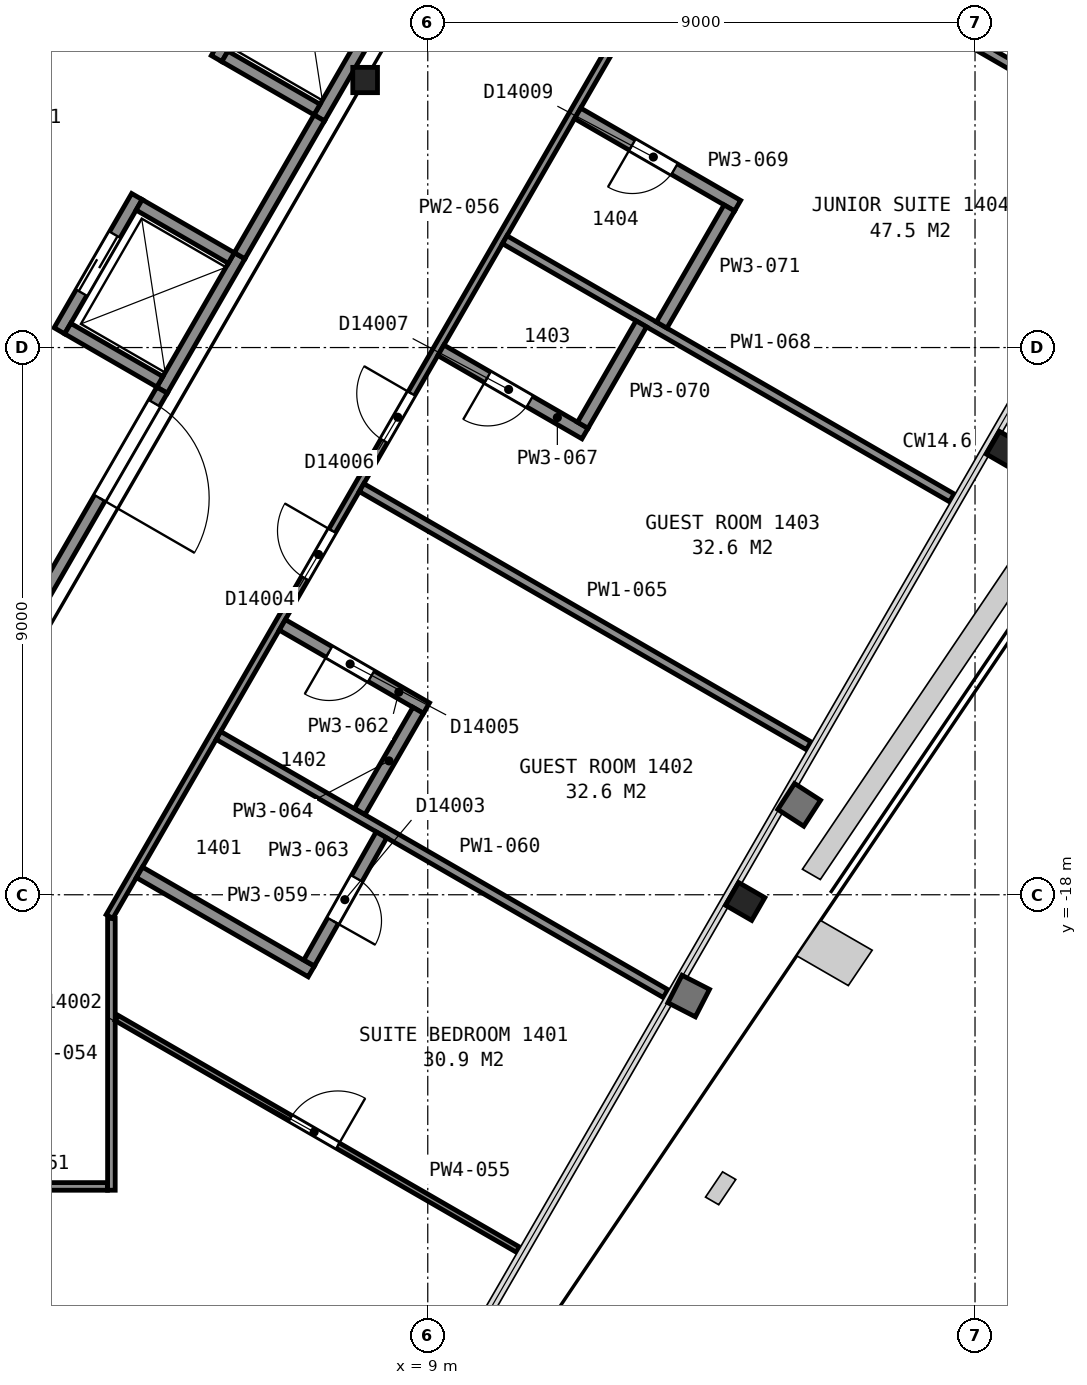
"""IFC4 building model, lengths in metres.
Left out: names, types, materials, properties, quantities, classifications, styles, units other than length and angle.
Written with IfcOpenShell. Run it as: python <this file> out.ifc"""

import sys

from ifc_helpers import new_model, si_unit, direction, frame, frame_2d, origin, origin_2d, place, context, subcontext, project, spatial, rectangle, i_section, extrude, element, fill, save


model = new_model("IFC4")
c1 = context("Model", 3, precision=1e-05, world=origin(), true_north=direction((0.0, 1.0)))
c2 = subcontext(c1, "Body", "Model", "MODEL_VIEW")
j1 = project(units=[si_unit("LENGTHUNIT", "METRE"), si_unit("PLANEANGLEUNIT", "RADIAN")], contexts=[c1])
p1 = place(None, origin())
s1 = spatial("IfcSite", under=j1, at=p1, CompositionType="ELEMENT")
p2 = place(p1, origin())
s2 = spatial("IfcBuilding", under=s1, at=p2, CompositionType="ELEMENT")
p3 = place(p2, frame((0.0, 0.0, 65.6)))
s3 = spatial("IfcBuildingStorey", under=s2, at=p3, CompositionType="ELEMENT", Elevation=65.6)
for number, where, z_axis, x_axis in (
    (1, (14.22, -18.11, 0.025), (0.0, 0.0, 1.0), (-0.5, -0.866, 0.0)),
    (2, (18.51, -10.69, 0.025), (0.0, 0.0, 1.0), (-0.5, -0.866, 0.0)),
):
    element("IfcColumn", number, at=place(p3, frame(where, z_axis=z_axis, x_axis=x_axis)), inside=s3, PredefinedType="COLUMN", context=c2, shape_type="SweptSolid", body=[
        extrude(i_section(OverallWidth=0.432, OverallDepth=0.498, WebThickness=0.056, FlangeThickness=0.089, FilletRadius=0.015, at=origin_2d()), origin(), (0.0, 0.0, 1.0), 3.575),
    ])
p4 = place(p3, frame((7.97, -4.6, 0.0), z_axis=(0.0, 0.0, 1.0), x_axis=(1.0, 0.0, 0.0)))
e3 = element("IfcColumn", 3, at=p4, inside=s3, PredefinedType="COLUMN", context=c2, shape_type="SweptSolid", body=[
    extrude(i_section(OverallWidth=0.406, OverallDepth=0.417, WebThickness=0.03, FlangeThickness=0.048, FilletRadius=0.015, at=origin_2d()), origin(), (0.0, 0.0, 1.0), 3.6),
])
p5 = place(p3, frame((4.63, -9.7, 0.0), z_axis=(0.0, 0.0, 1.0), x_axis=(0.500062241894, 0.865989465428, 0.0)))
e4 = element("IfcWall", 4, at=p5, inside=s3, PredefinedType="PARTITIONING", context=c2, shape_type="SweptSolid", body=[
    extrude(rectangle(XDim=2.55, YDim=0.2, at=frame_2d((1.275, 0.0))), origin(), (0.0, 0.0, 1.0), 3.6),
])
p6 = place(p3, frame((7.216, -5.222, 0.0), z_axis=(0.0, 0.0, 1.0), x_axis=(0.499990435942, 0.866030925526, 0.0)))
e5 = element("IfcWall", 5, at=p6, inside=s3, PredefinedType="PARTITIONING", context=c2, shape_type="SweptSolid", body=[
    extrude(rectangle(XDim=2.55, YDim=0.2, at=frame_2d((1.275, 0.0))), origin(), (0.0, 0.0, 1.0), 3.6),
])
p7 = place(p3, frame((2.942, -8.725, 0.0), z_axis=(0.0, 0.0, 1.0), x_axis=(0.500020783669, 0.866013403995, 0.0)))
e6 = element("IfcWall", 6, at=p7, inside=s3, PredefinedType="PARTITIONING", context=c2, shape_type="SweptSolid", body=[
    extrude(rectangle(XDim=2.55, YDim=0.2, at=frame_2d((1.275, 0.0))), origin(), (0.0, 0.0, 1.0), 3.6),
])
p8 = place(p7, frame((0.725, 0.0, 0.0)))
e7 = element("IfcOpeningElement", 7, at=p8, cuts=e6, PredefinedType="OPENING", context=c2, shape_type="SweptSolid", body=[
    extrude(rectangle(XDim=1.1, YDim=2.1, at=frame_2d((0.55, 1.05))), frame((0.0, 0.11, 0.0), z_axis=(0.0, -1.0, 0.0), x_axis=(1.0, 0.0, 0.0)), (0.0, 0.0, 1.0), 0.22),
])
p9 = place(p3, frame((5.527, -4.247, 0.0), z_axis=(0.0, 0.0, 1.0), x_axis=(0.499938297808, 0.866061024631, 0.0)))
e8 = element("IfcWall", 8, at=p9, inside=s3, PredefinedType="PARTITIONING", context=c2, shape_type="SweptSolid", body=[
    extrude(rectangle(XDim=2.35, YDim=0.2, at=frame_2d((1.175, 0.0))), origin(), (0.0, 0.0, 1.0), 3.6),
])
p10 = place(p9, frame((0.725, 0.0, 0.0)))
e9 = element("IfcOpeningElement", 9, at=p10, cuts=e8, PredefinedType="OPENING", context=c2, shape_type="SweptSolid", body=[
    extrude(rectangle(XDim=1.1, YDim=2.1, at=frame_2d((0.55, 1.05))), frame((0.0, 0.11, 0.0), z_axis=(0.0, -1.0, 0.0), x_axis=(1.0, 0.0, 0.0)), (0.0, 0.0, 1.0), 0.22),
])
p11 = place(p3, frame((7.179, -5.086, 0.0), z_axis=(0.0, 0.0, 1.0), x_axis=(-0.866036909293, 0.499980071345, 0.0)))
e10 = element("IfcWall", 10, at=p11, inside=s3, PredefinedType="PARTITIONING", context=c2, shape_type="SweptSolid", body=[
    extrude(rectangle(XDim=1.75, YDim=0.2, at=frame_2d((0.875, 0.0))), origin(), (0.0, 0.0, 1.0), 3.6),
])
p12 = place(p3, frame((5.769, -7.528, 0.0), z_axis=(0.0, 0.0, 1.0), x_axis=(-0.866002029911, 0.500040482552, 0.0)))
e11 = element("IfcWall", 11, at=p12, inside=s3, PredefinedType="PARTITIONING", context=c2, shape_type="SweptSolid", body=[
    extrude(rectangle(XDim=1.75, YDim=0.2, at=frame_2d((0.875, 0.0))), origin(), (0.0, 0.0, 1.0), 3.6),
])
p13 = place(p3, frame((4.594, -9.563, 0.0), z_axis=(0.0, 0.0, 1.0), x_axis=(-0.866036909293, 0.499980071345, 0.0)))
e12 = element("IfcWall", 12, at=p13, inside=s3, PredefinedType="PARTITIONING", context=c2, shape_type="SweptSolid", body=[
    extrude(rectangle(XDim=1.75, YDim=0.2, at=frame_2d((0.875, 0.0))), origin(), (0.0, 0.0, 1.0), 3.6),
])
p14 = place(p3, frame((1.677, -14.815, 0.0), z_axis=(0.0, 0.0, 1.0), x_axis=(0.49999445743, 0.866028603765, 0.0)))
e13 = element("IfcWall", 13, at=p14, inside=s3, PredefinedType="PARTITIONING", context=c2, shape_type="SweptSolid", body=[
    extrude(rectangle(XDim=5.905, YDim=0.2, at=frame_2d((2.952, 0.0))), origin(), (0.0, 0.0, 1.0), 3.35),
])
p15 = place(p14, frame((3.855, 0.0, 0.0)))
e14 = element("IfcOpeningElement", 14, at=p15, cuts=e13, PredefinedType="OPENING", context=c2, shape_type="SweptSolid", body=[
    extrude(rectangle(XDim=1.8, YDim=2.1, at=frame_2d((0.9, 1.05))), frame((0.0, 0.11, 0.0), z_axis=(0.0, -1.0, 0.0), x_axis=(1.0, 0.0, 0.0)), (0.0, 0.0, 1.0), 0.22),
])
p16 = place(p3, frame((5.906, -7.49, 0.0), z_axis=(0.0, 0.0, 1.0), x_axis=(0.500252727967, 0.865879442048, 0.0)))
e15 = element("IfcWall", 15, at=p16, inside=s3, PredefinedType="PARTITIONING", context=c2, shape_type="SweptSolid", body=[
    extrude(rectangle(XDim=2.617, YDim=0.2, at=frame_2d((1.309, 0.0))), origin(), (0.0, 0.0, 1.0), 3.35),
])
p17 = place(p3, frame((1.14, -22.797, 0.0), z_axis=(0.0, 0.0, 1.0), x_axis=(1.0, 0.0, 0.0)))
e16 = element("IfcWall", 16, at=p17, inside=s3, PredefinedType="PARTITIONING", context=c2, shape_type="SweptSolid", body=[
    extrude(rectangle(XDim=2.592, YDim=0.125, at=frame_2d((1.296, 0.0))), origin(), (0.0, 0.0, 1.0), 2.613),
])
p18 = place(p3, frame((3.797, -22.86, 0.0), z_axis=(0.0, 0.0, 1.0), x_axis=(0.0, 1.0, 0.0)))
e17 = element("IfcWall", 17, at=p18, inside=s3, PredefinedType="PARTITIONING", context=c2, shape_type="SweptSolid", body=[
    extrude(rectangle(XDim=4.471, YDim=0.125, at=frame_2d((2.235, 0.0))), origin(), (0.0, 0.0, 1.0), 2.613),
])
p19 = place(p3, frame((3.885, -20.028, 0.0), z_axis=(0.0, 0.0, 1.0), x_axis=(0.866080975745, -0.499903734186, 0.0)))
e18 = element("IfcWall", 18, at=p19, inside=s3, PredefinedType="PARTITIONING", context=c2, shape_type="SweptSolid", body=[
    extrude(rectangle(XDim=7.617, YDim=0.1, at=frame_2d((3.808, 0.0))), origin(), (0.0, 0.0, 1.0), 2.613),
])
p20 = place(p19, frame((3.299, 0.0, 0.0)))
e19 = element("IfcOpeningElement", 19, at=p20, cuts=e18, PredefinedType="OPENING", context=c2, shape_type="SweptSolid", body=[
    extrude(rectangle(XDim=0.9, YDim=2.1, at=frame_2d((0.45, 1.05))), frame((0.0, 0.06, 0.0), z_axis=(0.0, -1.0, 0.0), x_axis=(1.0, 0.0, 0.0)), (0.0, 0.0, 1.0), 0.12),
])
p21 = place(p3, frame((18.179, 6.606, 0.0), z_axis=(0.0, 0.0, 1.0), x_axis=(-0.500003973642, -0.866023109589, 0.0)))
e20 = element("IfcWall", 20, at=p21, inside=s3, PredefinedType="PARTITIONING", context=c2, shape_type="SweptSolid", body=[
    extrude(rectangle(XDim=28.826, YDim=0.125, at=frame_2d((14.413, 0.0))), origin(), (0.0, 0.0, 1.0), 2.613),
])
p22 = place(p21, frame((21.501, 0.0, 0.0)))
e21 = element("IfcOpeningElement", 21, at=p22, cuts=e20, PredefinedType="OPENING", context=c2, shape_type="SweptSolid", body=[
    extrude(rectangle(XDim=0.9, YDim=2.1, at=frame_2d((0.45, 1.05))), frame((0.0, 0.073, 0.0), z_axis=(0.0, -1.0, 0.0), x_axis=(1.0, 0.0, 0.0)), (0.0, 0.0, 1.0), 0.145),
])
p23 = place(p21, frame((18.894, 0.0, 0.0)))
e22 = element("IfcOpeningElement", 22, at=p23, cuts=e20, PredefinedType="OPENING", context=c2, shape_type="SweptSolid", body=[
    extrude(rectangle(XDim=0.9, YDim=2.1, at=frame_2d((0.45, 1.05))), frame((0.0, 0.073, 0.0), z_axis=(0.0, -1.0, 0.0), x_axis=(1.0, 0.0, 0.0)), (0.0, 0.0, 1.0), 0.145),
])
p24 = place(p21, frame((10.937, 0.0, 0.0)))
e23 = element("IfcOpeningElement", 23, at=p24, cuts=e20, PredefinedType="OPENING", context=c2, shape_type="SweptSolid", body=[
    extrude(rectangle(XDim=0.9, YDim=2.1, at=frame_2d((0.45, 1.05))), frame((0.0, 0.073, 0.0), z_axis=(0.0, -1.0, 0.0), x_axis=(1.0, 0.0, 0.0)), (0.0, 0.0, 1.0), 0.145),
])
p25 = place(p21, frame((7.535, 0.0, 0.0)))
e24 = element("IfcOpeningElement", 24, at=p25, cuts=e20, PredefinedType="OPENING", context=c2, shape_type="SweptSolid", body=[
    extrude(rectangle(XDim=0.9, YDim=2.1, at=frame_2d((0.45, 1.05))), frame((0.0, 0.073, 0.0), z_axis=(0.0, -1.0, 0.0), x_axis=(1.0, 0.0, 0.0)), (0.0, 0.0, 1.0), 0.145),
])
p26 = place(p21, frame((0.827, 0.0, 0.0)))
e25 = element("IfcOpeningElement", 25, at=p26, cuts=e20, PredefinedType="OPENING", context=c2, shape_type="SweptSolid", body=[
    extrude(rectangle(XDim=0.9, YDim=2.1, at=frame_2d((0.45, 1.05))), frame((0.0, 0.073, 0.0), z_axis=(0.0, -1.0, 0.0), x_axis=(1.0, 0.0, 0.0)), (0.0, 0.0, 1.0), 0.145),
])
p27 = place(p3, frame((4.258, -17.631, 0.0), z_axis=(0.0, 0.0, 1.0), x_axis=(0.865982457891, -0.500074377092, 0.0)))
e26 = element("IfcWall", 26, at=p27, inside=s3, PredefinedType="PARTITIONING", context=c2, shape_type="SweptSolid", body=[
    extrude(rectangle(XDim=3.263, YDim=0.2, at=frame_2d((1.631, 0.0))), origin(), (0.0, 0.0, 1.0), 2.613),
])
p28 = place(p3, frame((5.558, -15.38, 0.0), z_axis=(0.0, 0.0, 1.0), x_axis=(0.866022790583, -0.50000452617, 0.0)))
e27 = element("IfcWall", 27, at=p28, inside=s3, PredefinedType="PARTITIONING", context=c2, shape_type="SweptSolid", body=[
    extrude(rectangle(XDim=8.491, YDim=0.15, at=frame_2d((4.246, 0.0))), origin(), (0.0, 0.0, 1.0), 2.613),
])
p29 = place(p3, frame((8.979, -14.93, 0.0), z_axis=(0.0, 0.0, 1.0), x_axis=(-0.866005850709, 0.50003386539, 0.0)))
e28 = element("IfcWall", 28, at=p29, inside=s3, PredefinedType="PARTITIONING", context=c2, shape_type="SweptSolid", body=[
    extrude(rectangle(XDim=2.737, YDim=0.2, at=frame_2d((1.369, 0.0))), origin(), (0.0, 0.0, 1.0), 2.613),
])
p30 = place(p29, frame((1.05, 0.0, 0.0)))
e29 = element("IfcOpeningElement", 29, at=p30, cuts=e28, PredefinedType="OPENING", context=c2, shape_type="SweptSolid", body=[
    extrude(rectangle(XDim=0.8, YDim=2.1, at=frame_2d((0.4, 1.05))), frame((0.0, 0.11, 0.0), z_axis=(0.0, -1.0, 0.0), x_axis=(1.0, 0.0, 0.0)), (0.0, 0.0, 1.0), 0.22),
])
p31 = place(p3, frame((7.049, -19.122, 0.0), z_axis=(0.0, 0.0, 1.0), x_axis=(0.491544985814, 0.870852184312, 0.0)))
e30 = element("IfcWall", 30, at=p31, inside=s3, PredefinedType="PARTITIONING", context=c2, shape_type="SweptSolid", body=[
    extrude(rectangle(XDim=2.419, YDim=0.2, at=frame_2d((1.209, 0.0))), origin(), (0.0, 0.0, 1.0), 2.613),
])
p32 = place(p31, frame((0.795, 0.0, 0.0)))
e31 = element("IfcOpeningElement", 31, at=p32, cuts=e30, PredefinedType="OPENING", context=c2, shape_type="SweptSolid", body=[
    extrude(rectangle(XDim=0.8, YDim=2.1, at=frame_2d((0.4, 1.05))), frame((0.0, 0.11, 0.0), z_axis=(0.0, -1.0, 0.0), x_axis=(1.0, 0.0, 0.0)), (0.0, 0.0, 1.0), 0.22),
])
p33 = place(p3, frame((7.882, -16.63, 0.0), z_axis=(0.0, 0.0, 1.0), x_axis=(0.499913221443, 0.866075499611, 0.0)))
e32 = element("IfcWall", 32, at=p33, inside=s3, PredefinedType="PARTITIONING", context=c2, shape_type="SweptSolid", body=[
    extrude(rectangle(XDim=1.92, YDim=0.2, at=frame_2d((0.96, 0.0))), origin(), (0.0, 0.0, 1.0), 2.613),
])
p34 = place(p3, frame((7.911, -11.303, 0.0), z_axis=(0.0, 0.0, 1.0), x_axis=(0.866012267213, -0.500022752519, 0.0)))
e33 = element("IfcWall", 33, at=p34, inside=s3, PredefinedType="PARTITIONING", context=c2, shape_type="SweptSolid", body=[
    extrude(rectangle(XDim=8.492, YDim=0.15, at=frame_2d((4.246, 0.0))), origin(), (0.0, 0.0, 1.0), 2.613),
])
p35 = place(p3, frame((9.215, -9.045, 0.0), z_axis=(0.0, 0.0, 1.0), x_axis=(0.865989529477, -0.500062130976, 0.0)))
e34 = element("IfcWall", 34, at=p35, inside=s3, PredefinedType="PARTITIONING", context=c2, shape_type="SweptSolid", body=[
    extrude(rectangle(XDim=2.738, YDim=0.2, at=frame_2d((1.369, 0.0))), origin(), (0.0, 0.0, 1.0), 2.613),
])
p36 = place(p35, frame((0.887, 0.0, 0.0)))
e35 = element("IfcOpeningElement", 35, at=p36, cuts=e34, PredefinedType="OPENING", context=c2, shape_type="SweptSolid", body=[
    extrude(rectangle(XDim=0.8, YDim=2.1, at=frame_2d((0.4, 1.05))), frame((0.0, 0.11, 0.0), z_axis=(0.0, -1.0, 0.0), x_axis=(1.0, 0.0, 0.0)), (0.0, 0.0, 1.0), 0.22),
])
p37 = place(p3, frame((10.265, -7.226, 0.0), z_axis=(0.0, 0.0, 1.0), x_axis=(0.866024716685, -0.500001190089, 0.0)))
e36 = element("IfcWall", 36, at=p37, inside=s3, PredefinedType="PARTITIONING", context=c2, shape_type="SweptSolid", body=[
    extrude(rectangle(XDim=8.492, YDim=0.15, at=frame_2d((4.246, 0.0))), origin(), (0.0, 0.0, 1.0), 2.613),
])
p38 = place(p3, frame((14.096, -6.667, 0.0), z_axis=(0.0, 0.0, 1.0), x_axis=(-0.866023634079, 0.500003065207, 0.0)))
e37 = element("IfcWall", 37, at=p38, inside=s3, PredefinedType="PARTITIONING", context=c2, shape_type="SweptSolid", body=[
    extrude(rectangle(XDim=3.038, YDim=0.2, at=frame_2d((1.519, 0.0))), origin(), (0.0, 0.0, 1.0), 2.613),
])
p39 = place(p38, frame((1.2, 0.0, 0.0)))
e38 = element("IfcOpeningElement", 38, at=p39, cuts=e37, PredefinedType="OPENING", context=c2, shape_type="SweptSolid", body=[
    extrude(rectangle(XDim=0.8, YDim=2.1, at=frame_2d((0.4, 1.05))), frame((0.0, 0.11, 0.0), z_axis=(0.0, -1.0, 0.0), x_axis=(1.0, 0.0, 0.0)), (0.0, 0.0, 1.0), 0.22),
])
p40 = place(p3, frame((11.549, -10.277, 0.0), z_axis=(0.0, 0.0, 1.0), x_axis=(0.499876134923, 0.86609690551, 0.0)))
e39 = element("IfcWall", 39, at=p40, inside=s3, PredefinedType="PARTITIONING", context=c2, shape_type="SweptSolid", body=[
    extrude(rectangle(XDim=1.925, YDim=0.2, at=frame_2d((0.963, 0.0))), origin(), (0.0, 0.0, 1.0), 2.613),
])
p41 = place(p3, frame((12.846, -8.63, 0.0), z_axis=(0.0, 0.0, 1.0), x_axis=(0.500092923031, 0.865971748, 0.0)))
e40 = element("IfcWall", 40, at=p41, inside=s3, PredefinedType="PARTITIONING", context=c2, shape_type="SweptSolid", body=[
    extrude(rectangle(XDim=2.225, YDim=0.2, at=frame_2d((1.112, 0.0))), origin(), (0.0, 0.0, 1.0), 2.613),
])
p42 = place(p3, frame((13.591, -1.466, 0.0), z_axis=(0.0, 0.0, 1.0), x_axis=(0.866022790583, -0.50000452617, 0.0)))
e41 = element("IfcWall", 41, at=p42, inside=s3, PredefinedType="PARTITIONING", context=c2, shape_type="SweptSolid", body=[
    extrude(rectangle(XDim=8.491, YDim=0.15, at=frame_2d((4.246, 0.0))), origin(), (0.0, 0.0, 1.0), 2.613),
])
p43 = place(p8, origin())
e42 = element("IfcDoor", 42, at=p43, inside=s3, OperationType="SLIDING_TO_RIGHT", PredefinedType="DOOR", context=c2, shape_type="SweptSolid", body=[
    extrude(rectangle(XDim=1.1, YDim=2.1, at=frame_2d((0.55, 1.05))), frame((0.0, 0.025, 0.0), z_axis=(0.0, -1.0, 0.0), x_axis=(1.0, 0.0, 0.0)), (0.0, 0.0, 1.0), 0.05),
])
fill(e7, e42)
p44 = place(p15, origin())
e43 = element("IfcDoor", 43, at=p44, inside=s3, OperationType="DOUBLE_DOOR_SINGLE_SWING", PredefinedType="DOOR", context=c2, shape_type="SweptSolid", body=[
    extrude(rectangle(XDim=1.8, YDim=2.1, at=frame_2d((0.9, 1.05))), frame((0.0, 0.025, 0.0), z_axis=(0.0, -1.0, 0.0), x_axis=(1.0, 0.0, 0.0)), (0.0, 0.0, 1.0), 0.05),
])
fill(e14, e43)
p45 = place(p20, origin())
e44 = element("IfcDoor", 44, at=p45, inside=s3, OperationType="SINGLE_SWING_RIGHT", PredefinedType="DOOR", context=c2, shape_type="SweptSolid", body=[
    extrude(rectangle(XDim=0.9, YDim=2.1, at=frame_2d((0.45, 1.05))), frame((0.0, 0.025, 0.0), z_axis=(0.0, -1.0, 0.0), x_axis=(1.0, 0.0, 0.0)), (0.0, 0.0, 1.0), 0.05),
])
fill(e19, e44)
p46 = place(p22, origin())
e45 = element("IfcDoor", 45, at=p46, inside=s3, OperationType="SINGLE_SWING_LEFT", PredefinedType="DOOR", context=c2, shape_type="SweptSolid", body=[
    extrude(rectangle(XDim=0.9, YDim=2.1, at=frame_2d((0.45, 1.05))), frame((0.0, 0.025, 0.0), z_axis=(0.0, -1.0, 0.0), x_axis=(1.0, 0.0, 0.0)), (0.0, 0.0, 1.0), 0.05),
])
fill(e21, e45)
p47 = place(p23, origin())
e46 = element("IfcDoor", 46, at=p47, inside=s3, OperationType="SINGLE_SWING_LEFT", PredefinedType="DOOR", context=c2, shape_type="SweptSolid", body=[
    extrude(rectangle(XDim=0.9, YDim=2.1, at=frame_2d((0.45, 1.05))), frame((0.0, 0.025, 0.0), z_axis=(0.0, -1.0, 0.0), x_axis=(1.0, 0.0, 0.0)), (0.0, 0.0, 1.0), 0.05),
])
fill(e22, e46)
p48 = place(p30, origin())
e47 = element("IfcDoor", 47, at=p48, inside=s3, OperationType="SINGLE_SWING_RIGHT", PredefinedType="DOOR", context=c2, shape_type="SweptSolid", body=[
    extrude(rectangle(XDim=0.8, YDim=2.1, at=frame_2d((0.4, 1.05))), frame((0.0, 0.025, 0.0), z_axis=(0.0, -1.0, 0.0), x_axis=(1.0, 0.0, 0.0)), (0.0, 0.0, 1.0), 0.05),
])
fill(e29, e47)
p49 = place(p32, origin())
e48 = element("IfcDoor", 48, at=p49, inside=s3, OperationType="SINGLE_SWING_LEFT", PredefinedType="DOOR", context=c2, shape_type="SweptSolid", body=[
    extrude(rectangle(XDim=0.8, YDim=2.1, at=frame_2d((0.4, 1.05))), frame((0.0, 0.025, 0.0), z_axis=(0.0, -1.0, 0.0), x_axis=(1.0, 0.0, 0.0)), (0.0, 0.0, 1.0), 0.05),
])
fill(e31, e48)
p50 = place(p36, origin())
e49 = element("IfcDoor", 49, at=p50, inside=s3, OperationType="SINGLE_SWING_LEFT", PredefinedType="DOOR", context=c2, shape_type="SweptSolid", body=[
    extrude(rectangle(XDim=0.8, YDim=2.1, at=frame_2d((0.4, 1.05))), frame((0.0, 0.025, 0.0), z_axis=(0.0, -1.0, 0.0), x_axis=(1.0, 0.0, 0.0)), (0.0, 0.0, 1.0), 0.05),
])
fill(e35, e49)
p51 = place(p39, origin())
e50 = element("IfcDoor", 50, at=p51, inside=s3, OperationType="SINGLE_SWING_RIGHT", PredefinedType="DOOR", context=c2, shape_type="SweptSolid", body=[
    extrude(rectangle(XDim=0.8, YDim=2.1, at=frame_2d((0.4, 1.05))), frame((0.0, 0.025, 0.0), z_axis=(0.0, -1.0, 0.0), x_axis=(1.0, 0.0, 0.0)), (0.0, 0.0, 1.0), 0.05),
])
fill(e38, e50)
save(model, sys.argv[1])
